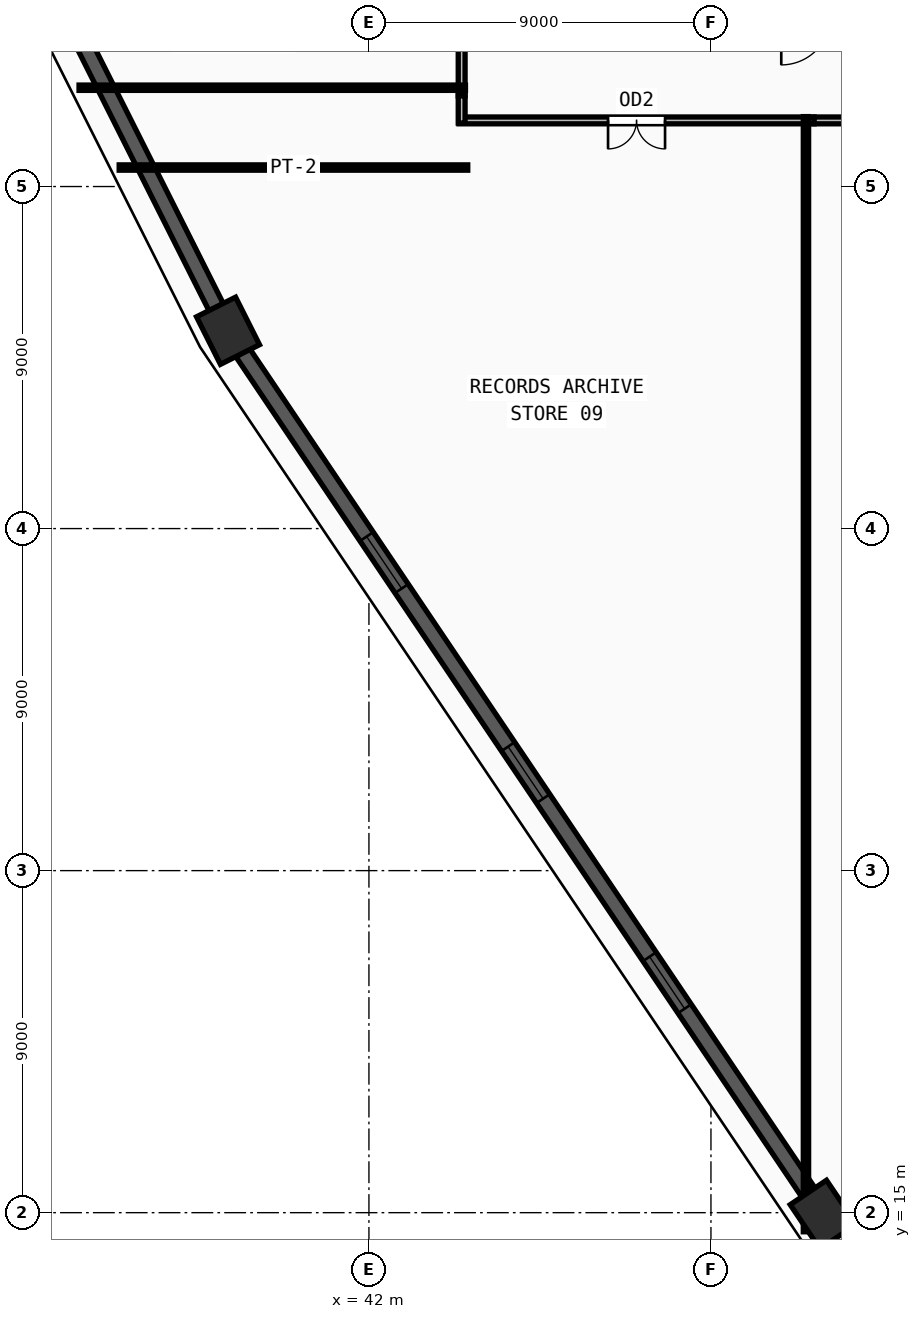
"""IFC4 building model, lengths in metres.
Left out: names, types, materials, properties, quantities, classifications, styles, units other than length and angle.
Written with IfcOpenShell. Run it as: python <this file> out.ifc"""

import sys

from ifc_helpers import new_model, si_unit, direction, frame, frame_2d, origin, origin_2d, place, context, subcontext, project, spatial, rectangle, extrude, source, transform, mapped, element, fill, save


model = new_model("IFC4")
c1 = context("Model", 3, precision=1e-05, world=origin(), true_north=direction((0.0, 1.0)))
c2 = subcontext(c1, "Body", "Model", "MODEL_VIEW")
j1 = project(units=[si_unit("LENGTHUNIT", "METRE"), si_unit("PLANEANGLEUNIT", "RADIAN")], contexts=[c1])
p1 = place(None, origin())
s1 = spatial("IfcSite", under=j1, at=p1, CompositionType="ELEMENT")
p2 = place(p1, origin())
s2 = spatial("IfcBuilding", under=s1, at=p2, CompositionType="ELEMENT")
p3 = place(p2, frame((0.0, 0.0, 102.0)))
s3 = spatial("IfcBuildingStorey", under=s2, at=p3, CompositionType="ELEMENT", Elevation=102.0)
m1 = source(origin(), c2, "Body", "SweptSolid", [
    extrude(rectangle(XDim=1.4, YDim=1.15, at=origin_2d()), origin(), (0.0, 0.0, 1.0), 3.75),
])
for number, where, z_axis, x_axis in (
    (1, (53.954, 14.951, 0.0), (0.0, 0.0, 1.0), (-0.559, 0.829, 0.0)),
    (2, (38.292, 38.205, 0.0), (0.0, 0.0, 1.0), (-0.449, 0.893, 0.0)),
):
    element("IfcColumn", number, at=place(p3, frame(where, z_axis=z_axis, x_axis=x_axis)), inside=s3, PredefinedType="COLUMN", context=c2, shape_type="MappedRepresentation", body=[
        mapped(m1, transform((0.0, 0.0, 0.0), x_axis=(1.0, 0.0, 0.0), y_axis=(0.0, 1.0, 0.0), z_axis=(0.0, 0.0, 1.0), scale=1.0)),
    ])
p4 = place(p3, frame((23.474, 67.677, 0.0), z_axis=(0.0, 0.0, 1.0), x_axis=(0.44918995427, -0.893436279196, 0.0)))
e3 = element("IfcWall", 3, at=p4, inside=s3, PredefinedType="SOLIDWALL", context=c2, shape_type="SweptSolid", body=[
    extrude(rectangle(XDim=32.298, YDim=0.42, at=frame_2d((16.149, 0.0))), origin(), (0.0, 0.0, 1.0), 3.57),
])
m2 = source(origin(), c2, "Body", "SweptSolid", [
    extrude(rectangle(XDim=1.65, YDim=1.95, at=frame_2d((0.825, 0.975))), frame((0.0, 0.22, 0.0), z_axis=(0.0, -1.0, 0.0), x_axis=(1.0, 0.0, 0.0)), (0.0, 0.0, 1.0), 0.44),
])
p5 = place(p4, frame((8.099, 0.0, 0.55)))
e4 = element("IfcOpeningElement", 4, at=p5, cuts=e3, PredefinedType="OPENING", context=c2, shape_type="MappedRepresentation", body=[
    mapped(m2, transform((0.0, 0.0, 0.0), x_axis=(1.0, 0.0, 0.0), y_axis=(0.0, 1.0, 0.0), z_axis=(0.0, 0.0, 1.0), scale=1.0)),
])
p6 = place(p4, frame((16.874, 0.0, 0.55)))
e5 = element("IfcOpeningElement", 5, at=p6, cuts=e3, PredefinedType="OPENING", context=c2, shape_type="MappedRepresentation", body=[
    mapped(m2, transform((0.0, 0.0, 0.0), x_axis=(1.0, 0.0, 0.0), y_axis=(0.0, 1.0, 0.0), z_axis=(0.0, 0.0, 1.0), scale=1.0)),
])
p7 = place(p4, frame((22.548, 0.0, 0.55)))
e6 = element("IfcOpeningElement", 6, at=p7, cuts=e3, PredefinedType="OPENING", context=c2, shape_type="MappedRepresentation", body=[
    mapped(m2, transform((0.0, 0.0, 0.0), x_axis=(1.0, 0.0, 0.0), y_axis=(0.0, 1.0, 0.0), z_axis=(0.0, 0.0, 1.0), scale=1.0)),
])
p8 = place(p3, frame((38.677, 37.633, 0.0), z_axis=(0.0, 0.0, 1.0), x_axis=(0.558641911568, -0.829408955004, 0.0)))
e7 = element("IfcWall", 7, at=p8, inside=s3, PredefinedType="SOLIDWALL", context=c2, shape_type="SweptSolid", body=[
    extrude(rectangle(XDim=26.658, YDim=0.42, at=frame_2d((13.329, 0.0))), origin(), (0.0, 0.0, 1.0), 3.57),
])
p9 = place(p8, frame((5.839, 0.0, 0.55)))
e8 = element("IfcOpeningElement", 8, at=p9, cuts=e7, PredefinedType="OPENING", context=c2, shape_type="MappedRepresentation", body=[
    mapped(m2, transform((0.0, 0.0, 0.0), x_axis=(1.0, 0.0, 0.0), y_axis=(0.0, 1.0, 0.0), z_axis=(0.0, 0.0, 1.0), scale=1.0)),
])
p10 = place(p8, frame((12.504, 0.0, 0.55)))
e9 = element("IfcOpeningElement", 9, at=p10, cuts=e7, PredefinedType="OPENING", context=c2, shape_type="MappedRepresentation", body=[
    mapped(m2, transform((0.0, 0.0, 0.0), x_axis=(1.0, 0.0, 0.0), y_axis=(0.0, 1.0, 0.0), z_axis=(0.0, 0.0, 1.0), scale=1.0)),
])
p11 = place(p8, frame((19.168, 0.0, 0.55)))
e10 = element("IfcOpeningElement", 10, at=p11, cuts=e7, PredefinedType="OPENING", context=c2, shape_type="MappedRepresentation", body=[
    mapped(m2, transform((0.0, 0.0, 0.0), x_axis=(1.0, 0.0, 0.0), y_axis=(0.0, 1.0, 0.0), z_axis=(0.0, 0.0, 1.0), scale=1.0)),
])
p12 = place(p3, frame((44.44, 44.385, 0.0), z_axis=(0.0, 0.0, 1.0), x_axis=(0.0, 1.0, 0.0)))
e11 = element("IfcWall", 11, at=p12, inside=s3, PredefinedType="PARTITIONING", context=c2, shape_type="SweptSolid", body=[
    extrude(rectangle(XDim=4.33, YDim=0.18, at=frame_2d((2.165, 0.0))), origin(), (0.0, 0.0, 1.0), 3.57),
])
m3 = source(origin(), c2, "Body", "SweptSolid", [
    extrude(rectangle(XDim=1.0, YDim=2.2, at=frame_2d((0.5, 1.1))), frame((0.0, 0.1, 0.0), z_axis=(0.0, -1.0, 0.0), x_axis=(1.0, 0.0, 0.0)), (0.0, 0.0, 1.0), 0.2),
])
p13 = place(p12, frame((1.665, 0.0, 0.0)))
e12 = element("IfcOpeningElement", 12, at=p13, cuts=e11, PredefinedType="OPENING", context=c2, shape_type="MappedRepresentation", body=[
    mapped(m3, transform((0.0, 0.0, 0.0), x_axis=(1.0, 0.0, 0.0), y_axis=(0.0, 1.0, 0.0), z_axis=(0.0, 0.0, 1.0), scale=1.0)),
])
p14 = place(p3, frame((53.715, 43.74, 0.0), z_axis=(0.0, 0.0, 1.0), x_axis=(-1.0, 0.0, 0.0)))
e13 = element("IfcWall", 13, at=p14, inside=s3, PredefinedType="PARTITIONING", context=c2, shape_type="SweptSolid", body=[
    extrude(rectangle(XDim=9.345, YDim=0.18, at=frame_2d((4.672, 0.0))), origin(), (0.0, 0.0, 1.0), 3.57),
])
m4 = source(origin(), c2, "Body", "SweptSolid", [
    extrude(rectangle(XDim=1.5, YDim=2.2, at=frame_2d((0.75, 1.1))), frame((0.0, 0.1, 0.0), z_axis=(0.0, -1.0, 0.0), x_axis=(1.0, 0.0, 0.0)), (0.0, 0.0, 1.0), 0.2),
])
p15 = place(p14, frame((3.923, 0.0, 0.0)))
e14 = element("IfcOpeningElement", 14, at=p15, cuts=e13, PredefinedType="OPENING", context=c2, shape_type="MappedRepresentation", body=[
    mapped(m4, transform((0.0, 0.0, 0.0), x_axis=(1.0, 0.0, 0.0), y_axis=(0.0, 1.0, 0.0), z_axis=(0.0, 0.0, 1.0), scale=1.0)),
])
p16 = place(p3, frame((75.63, 43.74, 0.0), z_axis=(0.0, 0.0, 1.0), x_axis=(-1.0, 0.0, 0.0)))
e15 = element("IfcWall", 15, at=p16, inside=s3, PredefinedType="PARTITIONING", context=c2, shape_type="SweptSolid", body=[
    extrude(rectangle(XDim=21.915, YDim=0.18, at=frame_2d((10.958, 0.0))), origin(), (0.0, 0.0, 1.0), 3.57),
])
p17 = place(p16, frame((9.907, 0.0, 0.0)))
e16 = element("IfcOpeningElement", 16, at=p17, cuts=e15, PredefinedType="OPENING", context=c2, shape_type="MappedRepresentation", body=[
    mapped(m4, transform((0.0, 0.0, 0.0), x_axis=(1.0, 0.0, 0.0), y_axis=(0.0, 1.0, 0.0), z_axis=(0.0, 0.0, 1.0), scale=1.0)),
])
p18 = place(p3, frame((44.44, 43.67, 0.0), z_axis=(0.0, 0.0, 1.0), x_axis=(0.0, 1.0, 0.0)))
e17 = element("IfcWall", 17, at=p18, inside=s3, PredefinedType="PARTITIONING", context=c2, shape_type="SweptSolid", body=[
    extrude(rectangle(XDim=0.715, YDim=0.18, at=frame_2d((0.357, 0.0))), origin(), (0.0, 0.0, 1.0), 3.57),
])
p19 = place(p3, frame((44.6, 42.5, 0.0), z_axis=(0.0, 0.0, 1.0), x_axis=(-1.0, 0.0, 0.0)))
e18 = element("IfcWall", 18, at=p19, inside=s3, PredefinedType="PARTITIONING", context=c2, shape_type="SweptSolid", body=[
    extrude(rectangle(XDim=9.172, YDim=0.14, at=frame_2d((4.586, 0.0))), origin(), (0.0, 0.0, 1.0), 3.57),
])
p20 = place(p3, frame((44.54, 44.6, 0.0), z_axis=(0.0, 0.0, 1.0), x_axis=(-1.0, 0.0, 0.0)))
e19 = element("IfcWall", 19, at=p20, inside=s3, PredefinedType="PARTITIONING", context=c2, shape_type="SweptSolid", body=[
    extrude(rectangle(XDim=10.168, YDim=0.14, at=frame_2d((5.084, 0.0))), origin(), (0.0, 0.0, 1.0), 3.57),
])
p21 = place(p3, frame((53.5, 43.84, 0.0), z_axis=(0.0, 0.0, 1.0), x_axis=(0.0, -1.0, 0.0)))
e20 = element("IfcWall", 20, at=p21, inside=s3, PredefinedType="PARTITIONING", context=c2, shape_type="SweptSolid", body=[
    extrude(rectangle(XDim=29.343, YDim=0.14, at=frame_2d((14.671, 0.0))), origin(), (0.0, 0.0, 1.0), 2.755),
])
m5 = source(origin(), c2, "Body", "SweptSolid", [
    extrude(rectangle(XDim=1.65, YDim=1.95, at=frame_2d((0.825, 0.975))), frame((0.0, 0.03, 0.0), z_axis=(0.0, -1.0, 0.0), x_axis=(1.0, 0.0, 0.0)), (0.0, 0.0, 1.0), 0.06),
])
p22 = place(p9, origin())
e21 = element("IfcWindow", 21, at=p22, inside=s3, PartitioningType="DOUBLE_PANEL_VERTICAL", PredefinedType="WINDOW", context=c2, shape_type="MappedRepresentation", body=[
    mapped(m5, transform((0.0, 0.0, 0.0), x_axis=(1.0, 0.0, 0.0), y_axis=(0.0, 1.0, 0.0), z_axis=(0.0, 0.0, 1.0), scale=1.0)),
])
fill(e8, e21)
p23 = place(p10, origin())
e22 = element("IfcWindow", 22, at=p23, inside=s3, PartitioningType="DOUBLE_PANEL_VERTICAL", PredefinedType="WINDOW", context=c2, shape_type="MappedRepresentation", body=[
    mapped(m5, transform((0.0, 0.0, 0.0), x_axis=(1.0, 0.0, 0.0), y_axis=(0.0, 1.0, 0.0), z_axis=(0.0, 0.0, 1.0), scale=1.0)),
])
fill(e9, e22)
p24 = place(p11, origin())
e23 = element("IfcWindow", 23, at=p24, inside=s3, PartitioningType="DOUBLE_PANEL_VERTICAL", PredefinedType="WINDOW", context=c2, shape_type="MappedRepresentation", body=[
    mapped(m5, transform((0.0, 0.0, 0.0), x_axis=(1.0, 0.0, 0.0), y_axis=(0.0, 1.0, 0.0), z_axis=(0.0, 0.0, 1.0), scale=1.0)),
])
fill(e10, e23)
m6 = source(origin(), c2, "Body", "SweptSolid", [
    extrude(rectangle(XDim=1.5, YDim=2.2, at=frame_2d((0.75, 1.1))), frame((0.0, 0.025, 0.0), z_axis=(0.0, -1.0, 0.0), x_axis=(1.0, 0.0, 0.0)), (0.0, 0.0, 1.0), 0.05),
])
p25 = place(p15, origin())
e24 = element("IfcDoor", 24, at=p25, inside=s3, OperationType="DOUBLE_DOOR_SINGLE_SWING", PredefinedType="DOOR", context=c2, shape_type="MappedRepresentation", body=[
    mapped(m6, transform((0.0, 0.0, 0.0), x_axis=(1.0, 0.0, 0.0), y_axis=(0.0, 1.0, 0.0), z_axis=(0.0, 0.0, 1.0), scale=1.0)),
])
fill(e14, e24)
save(model, sys.argv[1])
